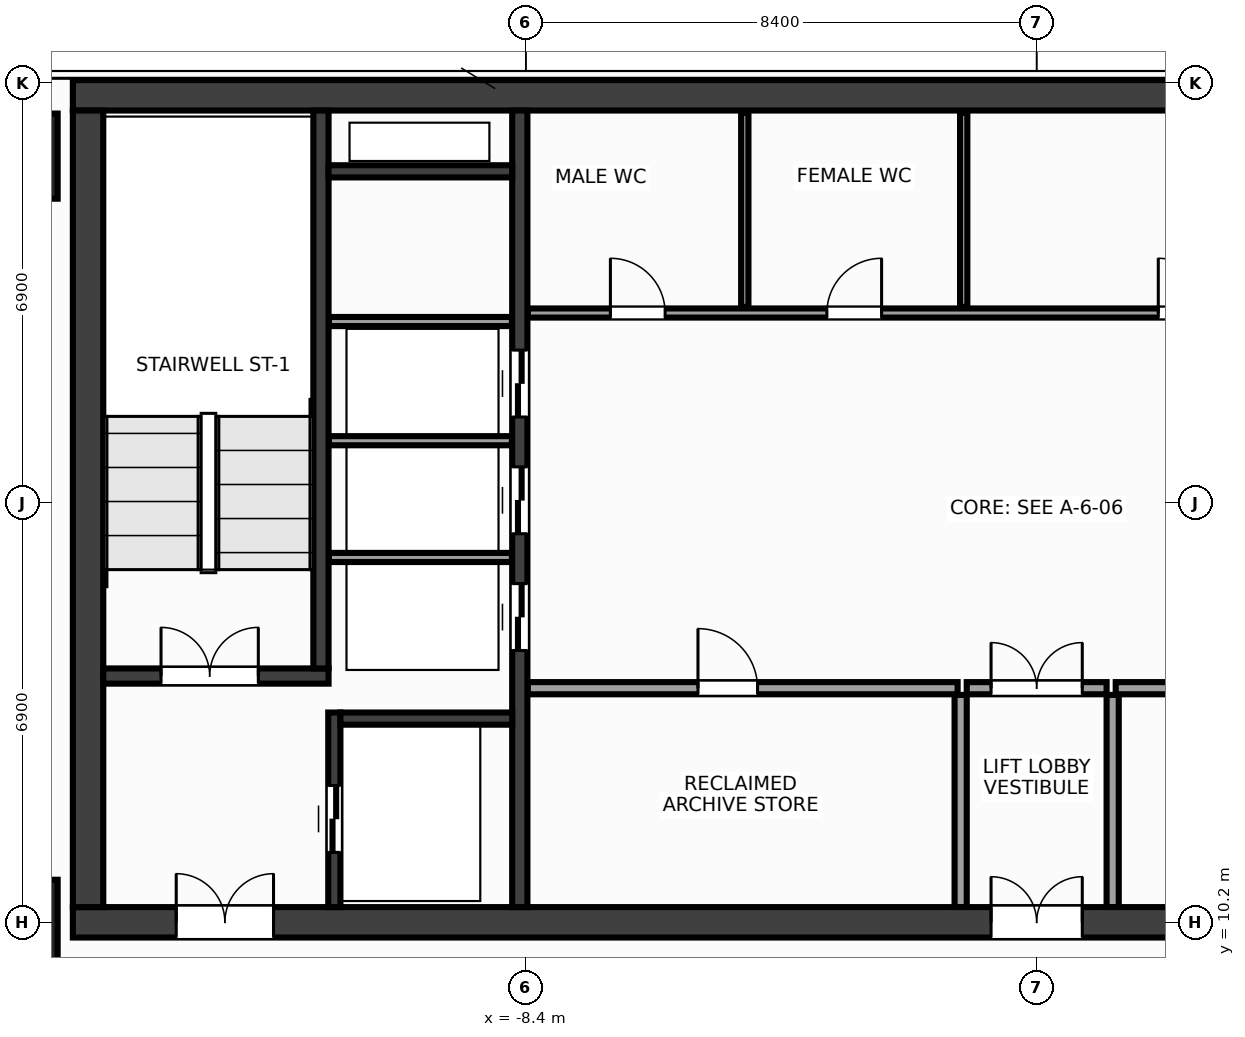
"""IFC4 building model, lengths in metres.
Left out: names, types, materials, properties, quantities, classifications, styles, units other than length and angle.
Written with IfcOpenShell. Run it as: python <this file> out.ifc"""

import sys

from ifc_helpers import new_model, si_unit, direction, frame, frame_2d, origin, origin_2d, place, context, subcontext, project, spatial, rectangle, extrude, source, transform, mapped, element, fill, save


model = new_model("IFC4")
c1 = context("Model", 3, precision=1e-05, world=origin(), true_north=direction((0.0, 1.0)))
c2 = subcontext(c1, "Body", "Model", "MODEL_VIEW")
j1 = project(units=[si_unit("LENGTHUNIT", "METRE"), si_unit("PLANEANGLEUNIT", "RADIAN")], contexts=[c1])
p1 = place(None, origin())
s1 = spatial("IfcSite", under=j1, at=p1, CompositionType="ELEMENT")
p2 = place(p1, origin())
s2 = spatial("IfcBuilding", under=s1, at=p2, CompositionType="ELEMENT")
p3 = place(p2, frame((0.0, 0.0, 264.8)))
s3 = spatial("IfcBuildingStorey", under=s2, at=p3, CompositionType="ELEMENT", Elevation=264.8)
m1 = source(origin(), c2, "Body", "SweptSolid", [
    extrude(rectangle(XDim=31.7, YDim=0.5, at=frame_2d((15.85, 0.0))), origin(), (0.0, 0.0, 1.0), 3.6),
])
p4 = place(p3, frame((-15.85, 23.8, 0.0), z_axis=(0.0, 0.0, 1.0), x_axis=(1.0, 0.0, 0.0)))
e1 = element("IfcWall", 1, at=p4, inside=s3, PredefinedType="SHEAR", context=c2, shape_type="MappedRepresentation", body=[
    mapped(m1, transform((0.0, 0.0, 0.0), x_axis=(1.0, 0.0, 0.0), y_axis=(0.0, 1.0, 0.0), z_axis=(0.0, 0.0, 1.0), scale=1.0)),
])
p5 = place(p3, frame((-15.85, 10.2, 0.0), z_axis=(0.0, 0.0, 1.0), x_axis=(1.0, 0.0, 0.0)))
e2 = element("IfcWall", 2, at=p5, inside=s3, PredefinedType="SHEAR", context=c2, shape_type="MappedRepresentation", body=[
    mapped(m1, transform((0.0, 0.0, 0.0), x_axis=(1.0, 0.0, 0.0), y_axis=(0.0, 1.0, 0.0), z_axis=(0.0, 0.0, 1.0), scale=1.0)),
])
p6 = place(p5, frame((1.7, 0.0, 0.0)))
e3 = element("IfcOpeningElement", 3, at=p6, cuts=e2, PredefinedType="OPENING", context=c2, shape_type="SweptSolid", body=[
    extrude(rectangle(XDim=1.6, YDim=2.15, at=frame_2d((0.8, 1.075))), frame((0.0, 0.262, 0.0), z_axis=(0.0, -1.0, 0.0), x_axis=(1.0, 0.0, 0.0)), (0.0, 0.0, 1.0), 0.524),
])
p7 = place(p5, frame((28.4, 0.0, 0.0)))
e4 = element("IfcOpeningElement", 4, at=p7, cuts=e2, PredefinedType="OPENING", context=c2, shape_type="SweptSolid", body=[
    extrude(rectangle(XDim=1.6, YDim=2.15, at=frame_2d((0.8, 1.075))), frame((0.0, 0.262, 0.0), z_axis=(0.0, -1.0, 0.0), x_axis=(1.0, 0.0, 0.0)), (0.0, 0.0, 1.0), 0.524),
])
p8 = place(p5, frame((15.1, 0.0, 0.0)))
e5 = element("IfcOpeningElement", 5, at=p8, cuts=e2, PredefinedType="OPENING", context=c2, shape_type="SweptSolid", body=[
    extrude(rectangle(XDim=1.5, YDim=2.2, at=frame_2d((0.75, 1.1))), frame((0.0, 0.262, 0.0), z_axis=(0.0, -1.0, 0.0), x_axis=(1.0, 0.0, 0.0)), (0.0, 0.0, 1.0), 0.524),
])
m2 = source(origin(), c2, "Body", "SweptSolid", [
    extrude(rectangle(XDim=13.1, YDim=0.5, at=frame_2d((6.55, 0.0))), origin(), (0.0, 0.0, 1.0), 3.6),
])
p9 = place(p3, frame((-15.6, 10.45, 0.0), z_axis=(0.0, 0.0, 1.0), x_axis=(0.0, 1.0, 0.0)))
e6 = element("IfcWall", 6, at=p9, inside=s3, PredefinedType="SHEAR", context=c2, shape_type="MappedRepresentation", body=[
    mapped(m2, transform((0.0, 0.0, 0.0), x_axis=(1.0, 0.0, 0.0), y_axis=(0.0, 1.0, 0.0), z_axis=(0.0, 0.0, 1.0), scale=1.0)),
])
m3 = source(origin(), c2, "Body", "SweptSolid", [
    extrude(rectangle(XDim=13.1, YDim=0.25, at=frame_2d((6.55, 0.0))), origin(), (0.0, 0.0, 1.0), 3.6),
])
p10 = place(p3, frame((-8.5, 10.45, 0.0), z_axis=(0.0, 0.0, 1.0), x_axis=(0.0, 1.0, 0.0)))
e7 = element("IfcWall", 7, at=p10, inside=s3, PredefinedType="SHEAR", context=c2, shape_type="MappedRepresentation", body=[
    mapped(m3, transform((0.0, 0.0, 0.0), x_axis=(1.0, 0.0, 0.0), y_axis=(0.0, 1.0, 0.0), z_axis=(0.0, 0.0, 1.0), scale=1.0)),
])
p11 = place(p10, frame((4.22, 0.0, 0.0)))
e8 = element("IfcOpeningElement", 8, at=p11, cuts=e7, PredefinedType="OPENING", context=c2, shape_type="SweptSolid", body=[
    extrude(rectangle(XDim=1.1, YDim=2.15, at=frame_2d((0.55, 1.075))), frame((0.0, 0.137, 0.0), z_axis=(0.0, -1.0, 0.0), x_axis=(1.0, 0.0, 0.0)), (0.0, 0.0, 1.0), 0.274),
])
p12 = place(p10, frame((6.14, 0.0, 0.0)))
e9 = element("IfcOpeningElement", 9, at=p12, cuts=e7, PredefinedType="OPENING", context=c2, shape_type="SweptSolid", body=[
    extrude(rectangle(XDim=1.1, YDim=2.15, at=frame_2d((0.55, 1.075))), frame((0.0, 0.137, 0.0), z_axis=(0.0, -1.0, 0.0), x_axis=(1.0, 0.0, 0.0)), (0.0, 0.0, 1.0), 0.274),
])
p13 = place(p10, frame((8.06, 0.0, 0.0)))
e10 = element("IfcOpeningElement", 10, at=p13, cuts=e7, PredefinedType="OPENING", context=c2, shape_type="SweptSolid", body=[
    extrude(rectangle(XDim=1.1, YDim=2.15, at=frame_2d((0.55, 1.075))), frame((0.0, 0.137, 0.0), z_axis=(0.0, -1.0, 0.0), x_axis=(1.0, 0.0, 0.0)), (0.0, 0.0, 1.0), 0.274),
])
m4 = source(origin(), c2, "Body", "SweptSolid", [
    extrude(rectangle(XDim=3.705, YDim=0.25, at=frame_2d((1.853, 0.0))), origin(), (0.0, 0.0, 1.0), 3.6),
])
p14 = place(p3, frame((-15.35, 14.25, 0.0), z_axis=(0.0, 0.0, 1.0), x_axis=(1.0, 0.0, 0.0)))
e11 = element("IfcWall", 11, at=p14, inside=s3, PredefinedType="SHEAR", context=c2, shape_type="MappedRepresentation", body=[
    mapped(m4, transform((0.0, 0.0, 0.0), x_axis=(1.0, 0.0, 0.0), y_axis=(0.0, 1.0, 0.0), z_axis=(0.0, 0.0, 1.0), scale=1.0)),
])
p15 = place(p14, frame((0.95, 0.0, 0.0)))
e12 = element("IfcOpeningElement", 12, at=p15, cuts=e11, PredefinedType="OPENING", context=c2, shape_type="SweptSolid", body=[
    extrude(rectangle(XDim=1.6, YDim=2.15, at=frame_2d((0.8, 1.075))), frame((0.0, 0.137, 0.0), z_axis=(0.0, -1.0, 0.0), x_axis=(1.0, 0.0, 0.0)), (0.0, 0.0, 1.0), 0.274),
])
m5 = source(origin(), c2, "Body", "SweptSolid", [
    extrude(rectangle(XDim=9.175, YDim=0.25, at=frame_2d((4.587, 0.0))), origin(), (0.0, 0.0, 1.0), 3.6),
])
p16 = place(p3, frame((-11.77, 14.375, 0.0), z_axis=(0.0, 0.0, 1.0), x_axis=(0.0, 1.0, 0.0)))
e13 = element("IfcWall", 13, at=p16, inside=s3, PredefinedType="SHEAR", context=c2, shape_type="MappedRepresentation", body=[
    mapped(m5, transform((0.0, 0.0, 0.0), x_axis=(1.0, 0.0, 0.0), y_axis=(0.0, 1.0, 0.0), z_axis=(0.0, 0.0, 1.0), scale=1.0)),
])
m6 = source(origin(), c2, "Body", "SweptSolid", [
    extrude(rectangle(XDim=3.2, YDim=0.2, at=frame_2d((1.6, 0.0))), origin(), (0.0, 0.0, 1.0), 3.6),
])
p17 = place(p3, frame((-11.55, 10.45, 0.0), z_axis=(0.0, 0.0, 1.0), x_axis=(0.0, 1.0, 0.0)))
e14 = element("IfcWall", 14, at=p17, inside=s3, PredefinedType="SHEAR", context=c2, shape_type="MappedRepresentation", body=[
    mapped(m6, transform((0.0, 0.0, 0.0), x_axis=(1.0, 0.0, 0.0), y_axis=(0.0, 1.0, 0.0), z_axis=(0.0, 0.0, 1.0), scale=1.0)),
])
p18 = place(p17, frame((0.9, 0.0, 0.0)))
e15 = element("IfcOpeningElement", 15, at=p18, cuts=e14, PredefinedType="OPENING", context=c2, shape_type="SweptSolid", body=[
    extrude(rectangle(XDim=1.1, YDim=2.15, at=frame_2d((0.55, 1.075))), frame((0.0, 0.112, 0.0), z_axis=(0.0, -1.0, 0.0), x_axis=(1.0, 0.0, 0.0)), (0.0, 0.0, 1.0), 0.224),
])
m7 = source(origin(), c2, "Body", "SweptSolid", [
    extrude(rectangle(XDim=2.825, YDim=0.2, at=frame_2d((1.413, 0.0))), origin(), (0.0, 0.0, 1.0), 3.6),
])
p19 = place(p3, frame((-11.45, 13.55, 0.0), z_axis=(0.0, 0.0, 1.0), x_axis=(1.0, 0.0, 0.0)))
e16 = element("IfcWall", 16, at=p19, inside=s3, PredefinedType="SHEAR", context=c2, shape_type="MappedRepresentation", body=[
    mapped(m7, transform((0.0, 0.0, 0.0), x_axis=(1.0, 0.0, 0.0), y_axis=(0.0, 1.0, 0.0), z_axis=(0.0, 0.0, 1.0), scale=1.0)),
])
m8 = source(origin(), c2, "Body", "SweptSolid", [
    extrude(rectangle(XDim=3.02, YDim=0.2, at=frame_2d((1.51, 0.0))), origin(), (0.0, 0.0, 1.0), 3.6),
])
p20 = place(p3, frame((-11.645, 22.55, 0.0), z_axis=(0.0, 0.0, 1.0), x_axis=(1.0, 0.0, 0.0)))
e17 = element("IfcWall", 17, at=p20, inside=s3, PredefinedType="SHEAR", context=c2, shape_type="MappedRepresentation", body=[
    mapped(m8, transform((0.0, 0.0, 0.0), x_axis=(1.0, 0.0, 0.0), y_axis=(0.0, 1.0, 0.0), z_axis=(0.0, 0.0, 1.0), scale=1.0)),
])
m9 = source(origin(), c2, "Body", "SweptSolid", [
    extrude(rectangle(XDim=1.4, YDim=1.4, at=origin_2d()), origin(), (0.0, 0.0, 1.0), 3.6),
])
for number, where, z_axis, x_axis in (
    (18, (-16.8, 10.2, 0.0), (0.0, 0.0, 1.0), (1.0, 0.0, 0.0)),
    (19, (-16.8, 22.8, 0.0), (0.0, 0.0, 1.0), (1.0, 0.0, 0.0)),
):
    element("IfcColumn", number, at=place(p3, frame(where, z_axis=z_axis, x_axis=x_axis)), inside=s3, PredefinedType="COLUMN", context=c2, shape_type="MappedRepresentation", body=[
        mapped(m9, transform((0.0, 0.0, 0.0), x_axis=(1.0, 0.0, 0.0), y_axis=(0.0, 1.0, 0.0), z_axis=(0.0, 0.0, 1.0), scale=1.0)),
    ])
m10 = source(origin(), c2, "Body", "SweptSolid", [
    extrude(rectangle(XDim=3.01, YDim=0.15, at=frame_2d((1.505, 0.0))), origin(), (0.0, 0.0, 1.0), 3.37),
])
for number, where, z_axis, x_axis in (
    (20, (-11.64, 16.2, 0.0), (0.0, 0.0, 1.0), (1.0, 0.0, 0.0)),
    (21, (-11.64, 18.12, 0.0), (0.0, 0.0, 1.0), (1.0, 0.0, 0.0)),
    (22, (-11.64, 20.08, 0.0), (0.0, 0.0, 1.0), (1.0, 0.0, 0.0)),
):
    element("IfcWall", number, at=place(p3, frame(where, z_axis=z_axis, x_axis=x_axis)), inside=s3, PredefinedType="PARTITIONING", context=c2, shape_type="MappedRepresentation", body=[
        mapped(m10, transform((0.0, 0.0, 0.0), x_axis=(1.0, 0.0, 0.0), y_axis=(0.0, 1.0, 0.0), z_axis=(0.0, 0.0, 1.0), scale=1.0)),
    ])
m11 = source(origin(), c2, "Body", "SweptSolid", [
    extrude(rectangle(XDim=7.07, YDim=0.2, at=frame_2d((3.535, 0.0))), origin(), (0.0, 0.0, 1.0), 3.37),
])
p21 = place(p3, frame((-8.37, 14.05, 0.0), z_axis=(0.0, 0.0, 1.0), x_axis=(1.0, 0.0, 0.0)))
e23 = element("IfcWall", 23, at=p21, inside=s3, PredefinedType="PARTITIONING", context=c2, shape_type="MappedRepresentation", body=[
    mapped(m11, transform((0.0, 0.0, 0.0), x_axis=(1.0, 0.0, 0.0), y_axis=(0.0, 1.0, 0.0), z_axis=(0.0, 0.0, 1.0), scale=1.0)),
])
p22 = place(p21, frame((2.8, 0.0, 0.0)))
e24 = element("IfcOpeningElement", 24, at=p22, cuts=e23, PredefinedType="OPENING", context=c2, shape_type="SweptSolid", body=[
    extrude(rectangle(XDim=0.98, YDim=2.15, at=frame_2d((0.49, 1.075))), frame((0.0, 0.112, 0.0), z_axis=(0.0, -1.0, 0.0), x_axis=(1.0, 0.0, 0.0)), (0.0, 0.0, 1.0), 0.224),
])
p23 = place(p3, frame((1.3, 14.05, 0.0), z_axis=(0.0, 0.0, 1.0), x_axis=(1.0, 0.0, 0.0)))
e25 = element("IfcWall", 25, at=p23, inside=s3, PredefinedType="PARTITIONING", context=c2, shape_type="MappedRepresentation", body=[
    mapped(m11, transform((0.0, 0.0, 0.0), x_axis=(1.0, 0.0, 0.0), y_axis=(0.0, 1.0, 0.0), z_axis=(0.0, 0.0, 1.0), scale=1.0)),
])
p24 = place(p23, frame((2.8, 0.0, 0.0)))
e26 = element("IfcOpeningElement", 26, at=p24, cuts=e25, PredefinedType="OPENING", context=c2, shape_type="SweptSolid", body=[
    extrude(rectangle(XDim=0.98, YDim=2.15, at=frame_2d((0.49, 1.075))), frame((0.0, 0.112, 0.0), z_axis=(0.0, -1.0, 0.0), x_axis=(1.0, 0.0, 0.0)), (0.0, 0.0, 1.0), 0.224),
])
m12 = source(origin(), c2, "Body", "SweptSolid", [
    extrude(rectangle(XDim=3.49, YDim=0.2, at=frame_2d((1.745, 0.0))), origin(), (0.0, 0.0, 1.0), 3.37),
])
for number, where, z_axis, x_axis in (
    (27, (-1.25, 10.45, 0.0), (0.0, 0.0, 1.0), (0.0, 1.0, 0.0)),
    (28, (1.25, 10.45, 0.0), (0.0, 0.0, 1.0), (0.0, 1.0, 0.0)),
):
    element("IfcWall", number, at=place(p3, frame(where, z_axis=z_axis, x_axis=x_axis)), inside=s3, PredefinedType="PARTITIONING", context=c2, shape_type="MappedRepresentation", body=[
        mapped(m12, transform((0.0, 0.0, 0.0), x_axis=(1.0, 0.0, 0.0), y_axis=(0.0, 1.0, 0.0), z_axis=(0.0, 0.0, 1.0), scale=1.0)),
    ])
m13 = source(origin(), c2, "Body", "SweptSolid", [
    extrude(rectangle(XDim=2.3, YDim=0.2, at=frame_2d((1.15, 0.0))), origin(), (0.0, 0.0, 1.0), 3.37),
])
p25 = place(p3, frame((-1.15, 14.05, 0.0), z_axis=(0.0, 0.0, 1.0), x_axis=(1.0, 0.0, 0.0)))
e29 = element("IfcWall", 29, at=p25, inside=s3, PredefinedType="PARTITIONING", context=c2, shape_type="MappedRepresentation", body=[
    mapped(m13, transform((0.0, 0.0, 0.0), x_axis=(1.0, 0.0, 0.0), y_axis=(0.0, 1.0, 0.0), z_axis=(0.0, 0.0, 1.0), scale=1.0)),
])
p26 = place(p25, frame((0.4, 0.0, 0.0)))
e30 = element("IfcOpeningElement", 30, at=p26, cuts=e29, PredefinedType="OPENING", context=c2, shape_type="SweptSolid", body=[
    extrude(rectangle(XDim=1.5, YDim=2.2, at=frame_2d((0.75, 1.1))), frame((0.0, 0.112, 0.0), z_axis=(0.0, -1.0, 0.0), x_axis=(1.0, 0.0, 0.0)), (0.0, 0.0, 1.0), 0.224),
])
m14 = source(origin(), c2, "Body", "SweptSolid", [
    extrude(rectangle(XDim=14.59, YDim=0.15, at=frame_2d((7.295, 0.0))), origin(), (0.0, 0.0, 1.0), 3.37),
])
p27 = place(p3, frame((-8.37, 20.22, 0.0), z_axis=(0.0, 0.0, 1.0), x_axis=(1.0, 0.0, 0.0)))
e31 = element("IfcWall", 31, at=p27, inside=s3, PredefinedType="PARTITIONING", context=c2, shape_type="MappedRepresentation", body=[
    mapped(m14, transform((0.0, 0.0, 0.0), x_axis=(1.0, 0.0, 0.0), y_axis=(0.0, 1.0, 0.0), z_axis=(0.0, 0.0, 1.0), scale=1.0)),
])
p28 = place(p27, frame((1.36, 0.0, 0.0)))
e32 = element("IfcOpeningElement", 32, at=p28, cuts=e31, PredefinedType="OPENING", context=c2, shape_type="SweptSolid", body=[
    extrude(rectangle(XDim=0.9, YDim=2.15, at=frame_2d((0.45, 1.075))), frame((0.0, 0.087, 0.0), z_axis=(0.0, -1.0, 0.0), x_axis=(1.0, 0.0, 0.0)), (0.0, 0.0, 1.0), 0.174),
])
p29 = place(p27, frame((4.92, 0.0, 0.0)))
e33 = element("IfcOpeningElement", 33, at=p29, cuts=e31, PredefinedType="OPENING", context=c2, shape_type="SweptSolid", body=[
    extrude(rectangle(XDim=0.9, YDim=2.15, at=frame_2d((0.45, 1.075))), frame((0.0, 0.087, 0.0), z_axis=(0.0, -1.0, 0.0), x_axis=(1.0, 0.0, 0.0)), (0.0, 0.0, 1.0), 0.174),
])
p30 = place(p27, frame((10.37, 0.0, 0.0)))
e34 = element("IfcOpeningElement", 34, at=p30, cuts=e31, PredefinedType="OPENING", context=c2, shape_type="SweptSolid", body=[
    extrude(rectangle(XDim=0.9, YDim=2.15, at=frame_2d((0.45, 1.075))), frame((0.0, 0.087, 0.0), z_axis=(0.0, -1.0, 0.0), x_axis=(1.0, 0.0, 0.0)), (0.0, 0.0, 1.0), 0.174),
])
m15 = source(origin(), c2, "Body", "SweptSolid", [
    extrude(rectangle(XDim=3.19, YDim=0.12, at=frame_2d((1.595, 0.0))), origin(), (0.0, 0.0, 1.0), 3.37),
])
for number, where, z_axis, x_axis in (
    (35, (-4.8, 20.32, 0.0), (0.0, 0.0, 1.0), (0.0, 1.0, 0.0)),
    (36, (-1.2, 20.32, 0.0), (0.0, 0.0, 1.0), (0.0, 1.0, 0.0)),
):
    element("IfcWall", number, at=place(p3, frame(where, z_axis=z_axis, x_axis=x_axis)), inside=s3, PredefinedType="PARTITIONING", context=c2, shape_type="MappedRepresentation", body=[
        mapped(m15, transform((0.0, 0.0, 0.0), x_axis=(1.0, 0.0, 0.0), y_axis=(0.0, 1.0, 0.0), z_axis=(0.0, 0.0, 1.0), scale=1.0)),
    ])
m16 = source(origin(), c2, "Body", "SweptSolid", [
    extrude(rectangle(XDim=1.6, YDim=2.15, at=frame_2d((0.8, 1.075))), frame((0.0, 0.025, 0.0), z_axis=(0.0, -1.0, 0.0), x_axis=(1.0, 0.0, 0.0)), (0.0, 0.0, 1.0), 0.05),
])
p31 = place(p15, origin())
e37 = element("IfcDoor", 37, at=p31, inside=s3, OperationType="DOUBLE_DOOR_SINGLE_SWING", PredefinedType="DOOR", context=c2, shape_type="MappedRepresentation", body=[
    mapped(m16, transform((0.0, 0.0, 0.0), x_axis=(1.0, 0.0, 0.0), y_axis=(0.0, 1.0, 0.0), z_axis=(0.0, 0.0, 1.0), scale=1.0)),
])
fill(e12, e37)
p32 = place(p6, origin())
e38 = element("IfcDoor", 38, at=p32, inside=s3, OperationType="DOUBLE_DOOR_SINGLE_SWING", PredefinedType="DOOR", context=c2, shape_type="MappedRepresentation", body=[
    mapped(m16, transform((0.0, 0.0, 0.0), x_axis=(1.0, 0.0, 0.0), y_axis=(0.0, 1.0, 0.0), z_axis=(0.0, 0.0, 1.0), scale=1.0)),
])
fill(e3, e38)
m17 = source(origin(), c2, "Body", "SweptSolid", [
    extrude(rectangle(XDim=1.1, YDim=2.15, at=frame_2d((0.55, 1.075))), frame((0.0, 0.025, 0.0), z_axis=(0.0, -1.0, 0.0), x_axis=(1.0, 0.0, 0.0)), (0.0, 0.0, 1.0), 0.05),
])
p33 = place(p18, origin())
e39 = element("IfcDoor", 39, at=p33, inside=s3, OperationType="DOUBLE_DOOR_SLIDING", PredefinedType="DOOR", context=c2, shape_type="MappedRepresentation", body=[
    mapped(m17, transform((0.0, 0.0, 0.0), x_axis=(1.0, 0.0, 0.0), y_axis=(0.0, 1.0, 0.0), z_axis=(0.0, 0.0, 1.0), scale=1.0)),
])
fill(e15, e39)
p34 = place(p11, origin())
e40 = element("IfcDoor", 40, at=p34, inside=s3, OperationType="DOUBLE_DOOR_SLIDING", PredefinedType="DOOR", context=c2, shape_type="MappedRepresentation", body=[
    mapped(m17, transform((0.0, 0.0, 0.0), x_axis=(1.0, 0.0, 0.0), y_axis=(0.0, 1.0, 0.0), z_axis=(0.0, 0.0, 1.0), scale=1.0)),
])
fill(e8, e40)
p35 = place(p12, origin())
e41 = element("IfcDoor", 41, at=p35, inside=s3, OperationType="DOUBLE_DOOR_SLIDING", PredefinedType="DOOR", context=c2, shape_type="MappedRepresentation", body=[
    mapped(m17, transform((0.0, 0.0, 0.0), x_axis=(1.0, 0.0, 0.0), y_axis=(0.0, 1.0, 0.0), z_axis=(0.0, 0.0, 1.0), scale=1.0)),
])
fill(e9, e41)
p36 = place(p13, origin())
e42 = element("IfcDoor", 42, at=p36, inside=s3, OperationType="DOUBLE_DOOR_SLIDING", PredefinedType="DOOR", context=c2, shape_type="MappedRepresentation", body=[
    mapped(m17, transform((0.0, 0.0, 0.0), x_axis=(1.0, 0.0, 0.0), y_axis=(0.0, 1.0, 0.0), z_axis=(0.0, 0.0, 1.0), scale=1.0)),
])
fill(e10, e42)
m18 = source(origin(), c2, "Body", "SweptSolid", [
    extrude(rectangle(XDim=0.98, YDim=2.15, at=frame_2d((0.49, 1.075))), frame((0.0, 0.025, 0.0), z_axis=(0.0, -1.0, 0.0), x_axis=(1.0, 0.0, 0.0)), (0.0, 0.0, 1.0), 0.05),
])
p37 = place(p22, origin())
e43 = element("IfcDoor", 43, at=p37, inside=s3, OperationType="SINGLE_SWING_LEFT", PredefinedType="DOOR", context=c2, shape_type="MappedRepresentation", body=[
    mapped(m18, transform((0.0, 0.0, 0.0), x_axis=(1.0, 0.0, 0.0), y_axis=(0.0, 1.0, 0.0), z_axis=(0.0, 0.0, 1.0), scale=1.0)),
])
fill(e24, e43)
m19 = source(origin(), c2, "Body", "SweptSolid", [
    extrude(rectangle(XDim=1.5, YDim=2.2, at=frame_2d((0.75, 1.1))), frame((0.0, 0.025, 0.0), z_axis=(0.0, -1.0, 0.0), x_axis=(1.0, 0.0, 0.0)), (0.0, 0.0, 1.0), 0.05),
])
p38 = place(p26, origin())
e44 = element("IfcDoor", 44, at=p38, inside=s3, OperationType="DOUBLE_DOOR_SINGLE_SWING", PredefinedType="DOOR", context=c2, shape_type="MappedRepresentation", body=[
    mapped(m19, transform((0.0, 0.0, 0.0), x_axis=(1.0, 0.0, 0.0), y_axis=(0.0, 1.0, 0.0), z_axis=(0.0, 0.0, 1.0), scale=1.0)),
])
fill(e30, e44)
p39 = place(p8, origin())
e45 = element("IfcDoor", 45, at=p39, inside=s3, OperationType="DOUBLE_DOOR_SINGLE_SWING", PredefinedType="DOOR", context=c2, shape_type="MappedRepresentation", body=[
    mapped(m19, transform((0.0, 0.0, 0.0), x_axis=(1.0, 0.0, 0.0), y_axis=(0.0, 1.0, 0.0), z_axis=(0.0, 0.0, 1.0), scale=1.0)),
])
fill(e5, e45)
m20 = source(origin(), c2, "Body", "SweptSolid", [
    extrude(rectangle(XDim=0.9, YDim=2.15, at=frame_2d((0.45, 1.075))), frame((0.0, 0.025, 0.0), z_axis=(0.0, -1.0, 0.0), x_axis=(1.0, 0.0, 0.0)), (0.0, 0.0, 1.0), 0.05),
])
p40 = place(p28, origin())
e46 = element("IfcDoor", 46, at=p40, inside=s3, OperationType="SINGLE_SWING_LEFT", PredefinedType="DOOR", context=c2, shape_type="MappedRepresentation", body=[
    mapped(m20, transform((0.0, 0.0, 0.0), x_axis=(1.0, 0.0, 0.0), y_axis=(0.0, 1.0, 0.0), z_axis=(0.0, 0.0, 1.0), scale=1.0)),
])
fill(e32, e46)
p41 = place(p29, origin())
e47 = element("IfcDoor", 47, at=p41, inside=s3, OperationType="SINGLE_SWING_RIGHT", PredefinedType="DOOR", context=c2, shape_type="MappedRepresentation", body=[
    mapped(m20, transform((0.0, 0.0, 0.0), x_axis=(1.0, 0.0, 0.0), y_axis=(0.0, 1.0, 0.0), z_axis=(0.0, 0.0, 1.0), scale=1.0)),
])
fill(e33, e47)
p42 = place(p30, origin())
e48 = element("IfcDoor", 48, at=p42, inside=s3, OperationType="SINGLE_SWING_LEFT", PredefinedType="DOOR", context=c2, shape_type="MappedRepresentation", body=[
    mapped(m20, transform((0.0, 0.0, 0.0), x_axis=(1.0, 0.0, 0.0), y_axis=(0.0, 1.0, 0.0), z_axis=(0.0, 0.0, 1.0), scale=1.0)),
])
fill(e34, e48)
save(model, sys.argv[1])
